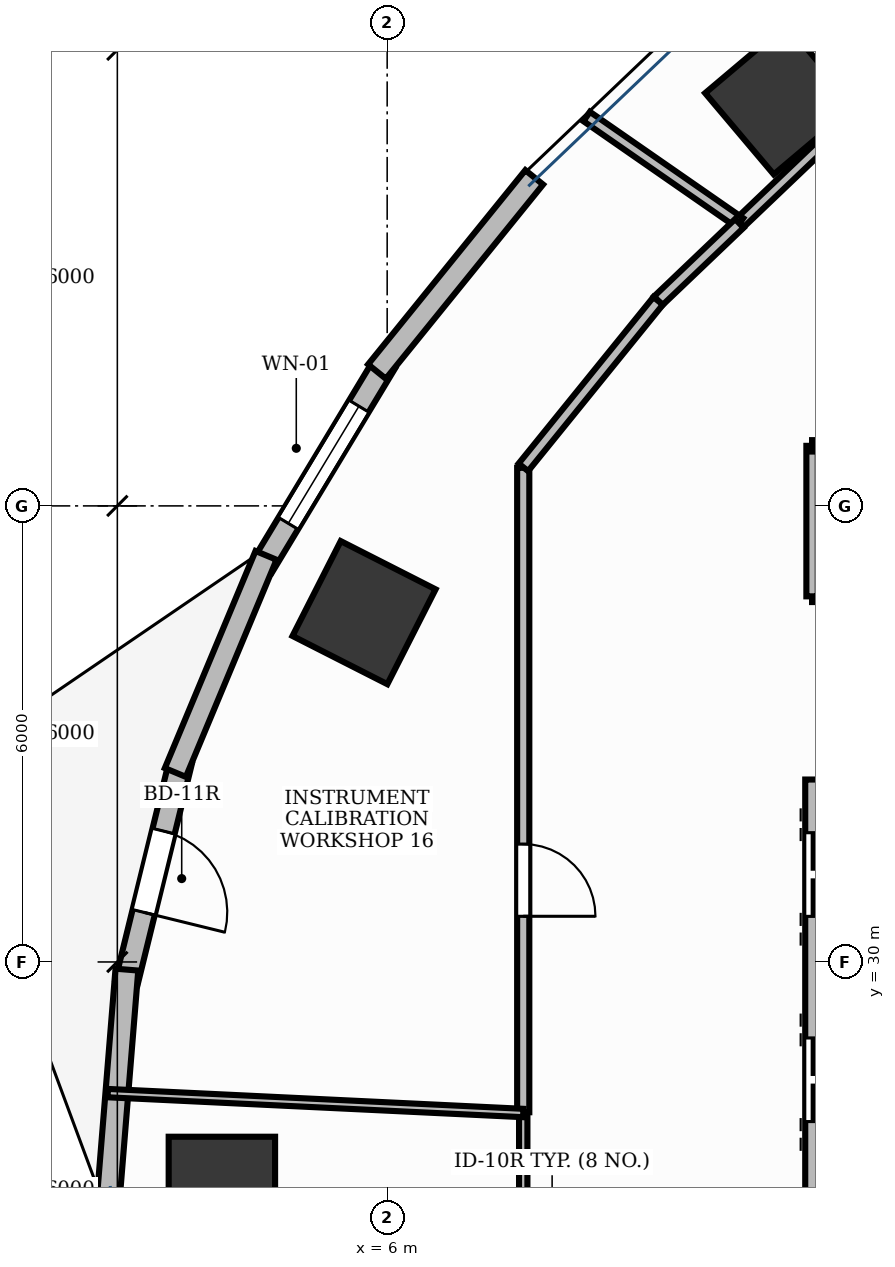
"""IFC4 building model, lengths in metres.
Left out: names, types, materials, properties, quantities, classifications, styles, units other than length and angle.
Written with IfcOpenShell. Run it as: python <this file> out.ifc"""

import sys

from ifc_helpers import new_model, si_unit, direction, frame, frame_2d, origin, origin_2d, place, context, subcontext, project, spatial, rectangle, extrude, element, fill, save


model = new_model("IFC4")
c1 = context("Model", 3, precision=1e-05, world=origin(), true_north=direction((0.0, 1.0)))
c2 = subcontext(c1, "Body", "Model", "MODEL_VIEW")
j1 = project(units=[si_unit("LENGTHUNIT", "METRE"), si_unit("PLANEANGLEUNIT", "RADIAN")], contexts=[c1])
p1 = place(None, origin())
s1 = spatial("IfcSite", under=j1, at=p1, CompositionType="ELEMENT")
p2 = place(p1, origin())
s2 = spatial("IfcBuilding", under=s1, at=p2, CompositionType="ELEMENT")
p3 = place(p2, frame((0.0, 0.0, 34.2)))
s3 = spatial("IfcBuildingStorey", under=s2, at=p3, CompositionType="ELEMENT", Elevation=34.2)
for number, where, z_axis, x_axis in (
    (1, (11.17, 41.347, -0.0), (0.0, 0.0, 1.0), (0.764, 0.645, 0.0)),
    (2, (5.696, 34.596, -0.0), (0.0, 0.0, 1.0), (0.453, 0.891, 0.0)),
    (3, (3.825, 27.001, -0.0), (0.0, 0.0, 1.0), (0.0, 1.0, 0.0)),
):
    element("IfcColumn", number, at=place(p3, frame(where, z_axis=z_axis, x_axis=x_axis)), inside=s3, PredefinedType="COLUMN", context=c2, shape_type="SweptSolid", body=[
        extrude(rectangle(XDim=1.4, YDim=1.4, at=origin_2d()), origin(), (0.0, 0.0, 1.0), 3.901),
    ])
p4 = place(p3, frame((5.975, 37.886, 0.0), z_axis=(0.0, 0.0, 1.0), x_axis=(-0.516447962267, -0.856318575222, 0.0)))
e4 = element("IfcWall", 4, at=p4, inside=s3, PredefinedType="STANDARD", context=c2, shape_type="SweptSolid", body=[
    extrude(rectangle(XDim=3.143, YDim=0.3, at=frame_2d((1.571, 0.0))), origin(), (0.0, 0.0, 1.0), 3.9),
])
p5 = place(p4, frame((0.671, 0.0, 0.9)))
e5 = element("IfcOpeningElement", 5, at=p5, cuts=e4, PredefinedType="OPENING", context=c2, shape_type="SweptSolid", body=[
    extrude(rectangle(XDim=1.8, YDim=2.1, at=frame_2d((0.9, 1.05))), frame((0.0, 0.165, 0.0), z_axis=(0.0, -1.0, 0.0), x_axis=(1.0, 0.0, 0.0)), (0.0, 0.0, 1.0), 0.33),
])
p6 = place(p3, frame((3.285, 32.641, 0.0), z_axis=(0.0, 0.0, 1.0), x_axis=(-0.238522035896, -0.971137085273, 0.0)))
e6 = element("IfcWall", 6, at=p6, inside=s3, PredefinedType="STANDARD", context=c2, shape_type="SweptSolid", body=[
    extrude(rectangle(XDim=2.993, YDim=0.3, at=frame_2d((1.497, 0.0))), origin(), (0.0, 0.0, 1.0), 3.9),
])
p7 = place(p6, frame((0.946, 0.0, 0.0)))
e7 = element("IfcOpeningElement", 7, at=p7, cuts=e6, PredefinedType="OPENING", context=c2, shape_type="SweptSolid", body=[
    extrude(rectangle(XDim=1.1, YDim=2.15, at=frame_2d((0.55, 1.075))), frame((0.0, 0.165, 0.0), z_axis=(0.0, -1.0, 0.0), x_axis=(1.0, 0.0, 0.0)), (0.0, 0.0, 1.0), 0.33),
])
p8 = place(p3, frame((7.934, 40.323, 0.0), z_axis=(0.0, 0.0, 1.0), x_axis=(-0.629221727718, -0.777225847079, 0.0)))
e8 = element("IfcWall", 8, at=p8, inside=s3, PredefinedType="STANDARD", context=c2, shape_type="SweptSolid", body=[
    extrude(rectangle(XDim=3.288, YDim=0.3, at=frame_2d((1.644, 0.0))), origin(), (0.0, 0.0, 1.0), 3.9),
])
p9 = place(p3, frame((4.406, 35.349, 0.0), z_axis=(0.0, 0.0, 1.0), x_axis=(-0.38535448421, -0.922768617531, 0.0)))
e9 = element("IfcWall", 9, at=p9, inside=s3, PredefinedType="STANDARD", context=c2, shape_type="SweptSolid", body=[
    extrude(rectangle(XDim=3.095, YDim=0.3, at=frame_2d((1.548, 0.0))), origin(), (0.0, 0.0, 1.0), 3.9),
])
p10 = place(p3, frame((2.576, 29.899, 0.0), z_axis=(0.0, 0.0, 1.0), x_axis=(-0.080890160317, -0.996723021689, 0.0)))
e10 = element("IfcWall", 10, at=p10, inside=s3, PredefinedType="STANDARD", context=c2, shape_type="SweptSolid", body=[
    extrude(rectangle(XDim=3.0, YDim=0.3, at=frame_2d((1.5, 0.0))), origin(), (0.0, 0.0, 1.0), 3.9),
])
p11 = place(p3, frame((11.6, 21.6, 0.0), z_axis=(0.0, 0.0, 1.0), x_axis=(0.0, 1.0, 0.0)))
e11 = element("IfcWall", 11, at=p11, inside=s3, PredefinedType="PARTITIONING", context=c2, shape_type="SweptSolid", body=[
    extrude(rectangle(XDim=10.8, YDim=0.2, at=frame_2d((5.4, 0.0))), origin(), (0.0, 0.0, 1.0), 2.91),
])
p12 = place(p11, frame((0.9, 0.0, 0.0)))
e12 = element("IfcOpeningElement", 12, at=p12, cuts=e11, PredefinedType="OPENING", context=c2, shape_type="SweptSolid", body=[
    extrude(rectangle(XDim=1.1, YDim=2.2, at=frame_2d((0.55, 1.1))), frame((0.0, 0.115, 0.0), z_axis=(0.0, -1.0, 0.0), x_axis=(1.0, 0.0, 0.0)), (0.0, 0.0, 1.0), 0.23),
])
p13 = place(p11, frame((3.6, 0.0, 0.0)))
e13 = element("IfcOpeningElement", 13, at=p13, cuts=e11, PredefinedType="OPENING", context=c2, shape_type="SweptSolid", body=[
    extrude(rectangle(XDim=1.1, YDim=2.2, at=frame_2d((0.55, 1.1))), frame((0.0, 0.115, 0.0), z_axis=(0.0, -1.0, 0.0), x_axis=(1.0, 0.0, 0.0)), (0.0, 0.0, 1.0), 0.23),
])
p14 = place(p11, frame((6.3, 0.0, 0.0)))
e14 = element("IfcOpeningElement", 14, at=p14, cuts=e11, PredefinedType="OPENING", context=c2, shape_type="SweptSolid", body=[
    extrude(rectangle(XDim=1.1, YDim=2.2, at=frame_2d((0.55, 1.1))), frame((0.0, 0.115, 0.0), z_axis=(0.0, -1.0, 0.0), x_axis=(1.0, 0.0, 0.0)), (0.0, 0.0, 1.0), 0.23),
])
p15 = place(p11, frame((9.0, 0.0, 0.0)))
e15 = element("IfcOpeningElement", 15, at=p15, cuts=e11, PredefinedType="OPENING", context=c2, shape_type="SweptSolid", body=[
    extrude(rectangle(XDim=1.1, YDim=2.2, at=frame_2d((0.55, 1.1))), frame((0.0, 0.115, 0.0), z_axis=(0.0, -1.0, 0.0), x_axis=(1.0, 0.0, 0.0)), (0.0, 0.0, 1.0), 0.23),
])
p16 = place(p3, frame((7.79, 28.013, 0.0), z_axis=(0.0, 0.0, 1.0), x_axis=(0.0, -1.0, 0.0)))
e16 = element("IfcWall", 16, at=p16, inside=s3, PredefinedType="MOVABLE", context=c2, shape_type="SweptSolid", body=[
    extrude(rectangle(XDim=9.111, YDim=0.11, at=frame_2d((4.555, 0.0))), origin(), (0.0, 0.0, 1.0), 2.91),
])
p17 = place(p16, frame((1.273, 0.0, 0.0)))
e17 = element("IfcOpeningElement", 17, at=p17, cuts=e16, PredefinedType="OPENING", context=c2, shape_type="SweptSolid", body=[
    extrude(rectangle(XDim=0.95, YDim=2.15, at=frame_2d((0.475, 1.075))), frame((0.0, 0.07, 0.0), z_axis=(0.0, -1.0, 0.0), x_axis=(1.0, 0.0, 0.0)), (0.0, 0.0, 1.0), 0.14),
])
p18 = place(p3, frame((21.74, 34.81, 0.0), z_axis=(0.0, 0.0, 1.0), x_axis=(-1.0, 0.0, 0.0)))
e18 = element("IfcWall", 18, at=p18, inside=s3, PredefinedType="PARTITIONING", context=c2, shape_type="SweptSolid", body=[
    extrude(rectangle(XDim=10.15, YDim=0.15, at=frame_2d((5.075, 0.0))), origin(), (0.0, 0.0, 1.0), 2.91),
])
p19 = place(p18, frame((8.96, 0.0, 0.0)))
e19 = element("IfcOpeningElement", 19, at=p19, cuts=e18, PredefinedType="OPENING", context=c2, shape_type="SweptSolid", body=[
    extrude(rectangle(XDim=0.95, YDim=2.15, at=frame_2d((0.475, 1.075))), frame((0.0, 0.09, 0.0), z_axis=(0.0, -1.0, 0.0), x_axis=(1.0, 0.0, 0.0)), (0.0, 0.0, 1.0), 0.18),
])
p20 = place(p3, frame((7.79, 36.501, 0.0), z_axis=(0.0, 0.0, 1.0), x_axis=(0.0, -1.0, 0.0)))
e20 = element("IfcWall", 20, at=p20, inside=s3, PredefinedType="PARTITIONING", context=c2, shape_type="SweptSolid", body=[
    extrude(rectangle(XDim=8.478, YDim=0.16, at=frame_2d((4.239, 0.0))), origin(), (0.0, 0.0, 1.0), 2.91),
])
p21 = place(p20, frame((4.95, 0.0, 0.0)))
e21 = element("IfcOpeningElement", 21, at=p21, cuts=e20, PredefinedType="OPENING", context=c2, shape_type="SweptSolid", body=[
    extrude(rectangle(XDim=0.95, YDim=2.15, at=frame_2d((0.475, 1.075))), frame((0.0, 0.095, 0.0), z_axis=(0.0, -1.0, 0.0), x_axis=(1.0, 0.0, 0.0)), (0.0, 0.0, 1.0), 0.19),
])
p22 = place(p3, frame((2.323, 28.275, 0.0), z_axis=(0.0, 0.0, 1.0), x_axis=(0.998855892644, -0.047821603185, 0.0)))
e22 = element("IfcWall", 22, at=p22, inside=s3, PredefinedType="MOVABLE", context=c2, shape_type="SweptSolid", body=[
    extrude(rectangle(XDim=5.473, YDim=0.11, at=frame_2d((2.736, 0.0))), origin(), (0.0, 0.0, 1.0), 2.91),
])
p23 = place(p3, frame((11.693, 40.727, 0.0), z_axis=(0.0, 0.0, 1.0), x_axis=(-0.723614682185, -0.690204166697, 0.0)))
e23 = element("IfcWall", 23, at=p23, inside=s3, PredefinedType="PARTITIONING", context=c2, shape_type="SweptSolid", body=[
    extrude(rectangle(XDim=1.454, YDim=0.15, at=frame_2d((0.727, 0.0))), origin(), (0.0, 0.0, 1.0), 2.91),
])
p24 = place(p3, frame((10.641, 39.723, 0.0), z_axis=(0.0, 0.0, 1.0), x_axis=(-0.821561492386, 0.570119912149, 0.0)))
e24 = element("IfcWall", 24, at=p24, inside=s3, PredefinedType="PARTITIONING", context=c2, shape_type="SweptSolid", body=[
    extrude(rectangle(XDim=2.455, YDim=0.15, at=frame_2d((1.227, 0.0))), origin(), (0.0, 0.0, 1.0), 2.91),
])
p25 = place(p3, frame((11.59, 34.81, 0.0), z_axis=(0.0, 0.0, 1.0), x_axis=(0.0, 1.0, 0.0)))
e25 = element("IfcWall", 25, at=p25, inside=s3, PredefinedType="PARTITIONING", context=c2, shape_type="SweptSolid", body=[
    extrude(rectangle(XDim=1.98, YDim=0.15, at=frame_2d((0.99, 0.0))), origin(), (0.0, 0.0, 1.0), 2.91),
])
p26 = place(p3, frame((11.59, 36.79, 0.0), z_axis=(0.0, 0.0, 1.0), x_axis=(1.0, 0.0, 0.0)))
e26 = element("IfcWall", 26, at=p26, inside=s3, PredefinedType="PARTITIONING", context=c2, shape_type="SweptSolid", body=[
    extrude(rectangle(XDim=5.21, YDim=0.15, at=frame_2d((2.605, 0.0))), origin(), (0.0, 0.0, 1.0), 2.91),
])
p27 = place(p3, frame((10.634, 39.717, 0.0), z_axis=(0.0, 0.0, 1.0), x_axis=(-0.723701031319, -0.690113626345, 0.0)))
e27 = element("IfcWall", 27, at=p27, inside=s3, PredefinedType="PARTITIONING", context=c2, shape_type="SweptSolid", body=[
    extrude(rectangle(XDim=1.476, YDim=0.16, at=frame_2d((0.738, 0.0))), origin(), (0.0, 0.0, 1.0), 2.91),
])
p28 = place(p3, frame((9.565, 38.697, 0.0), z_axis=(0.0, 0.0, 1.0), x_axis=(-0.629270515505, -0.777186347227, 0.0)))
e28 = element("IfcWall", 28, at=p28, inside=s3, PredefinedType="PARTITIONING", context=c2, shape_type="SweptSolid", body=[
    extrude(rectangle(XDim=2.817, YDim=0.16, at=frame_2d((1.409, 0.0))), origin(), (0.0, 0.0, 1.0), 2.91),
])
p29 = place(p5, origin())
e29 = element("IfcWindow", 29, at=p29, inside=s3, PartitioningType="SINGLE_PANEL", PredefinedType="WINDOW", context=c2, shape_type="SweptSolid", body=[
    extrude(rectangle(XDim=1.8, YDim=2.1, at=frame_2d((0.9, 1.05))), frame((0.0, 0.03, 0.0), z_axis=(0.0, -1.0, 0.0), x_axis=(1.0, 0.0, 0.0)), (0.0, 0.0, 1.0), 0.06),
])
fill(e5, e29)
p30 = place(p7, origin())
e30 = element("IfcDoor", 30, at=p30, inside=s3, OperationType="SINGLE_SWING_RIGHT", PredefinedType="DOOR", context=c2, shape_type="SweptSolid", body=[
    extrude(rectangle(XDim=1.1, YDim=2.15, at=frame_2d((0.55, 1.075))), frame((0.0, 0.025, 0.0), z_axis=(0.0, -1.0, 0.0), x_axis=(1.0, 0.0, 0.0)), (0.0, 0.0, 1.0), 0.05),
])
fill(e7, e30)
p31 = place(p14, origin())
e31 = element("IfcDoor", 31, at=p31, inside=s3, OperationType="DOUBLE_DOOR_SLIDING", PredefinedType="DOOR", context=c2, shape_type="SweptSolid", body=[
    extrude(rectangle(XDim=1.1, YDim=2.2, at=frame_2d((0.55, 1.1))), frame((0.0, 0.025, 0.0), z_axis=(0.0, -1.0, 0.0), x_axis=(1.0, 0.0, 0.0)), (0.0, 0.0, 1.0), 0.05),
])
fill(e14, e31)
p32 = place(p15, origin())
e32 = element("IfcDoor", 32, at=p32, inside=s3, OperationType="DOUBLE_DOOR_SLIDING", PredefinedType="DOOR", context=c2, shape_type="SweptSolid", body=[
    extrude(rectangle(XDim=1.1, YDim=2.2, at=frame_2d((0.55, 1.1))), frame((0.0, 0.025, 0.0), z_axis=(0.0, -1.0, 0.0), x_axis=(1.0, 0.0, 0.0)), (0.0, 0.0, 1.0), 0.05),
])
fill(e15, e32)
p33 = place(p21, origin())
e33 = element("IfcDoor", 33, at=p33, inside=s3, OperationType="SINGLE_SWING_RIGHT", PredefinedType="DOOR", context=c2, shape_type="SweptSolid", body=[
    extrude(rectangle(XDim=0.95, YDim=2.15, at=frame_2d((0.475, 1.075))), frame((0.0, 0.025, 0.0), z_axis=(0.0, -1.0, 0.0), x_axis=(1.0, 0.0, 0.0)), (0.0, 0.0, 1.0), 0.05),
])
fill(e21, e33)
save(model, sys.argv[1])
